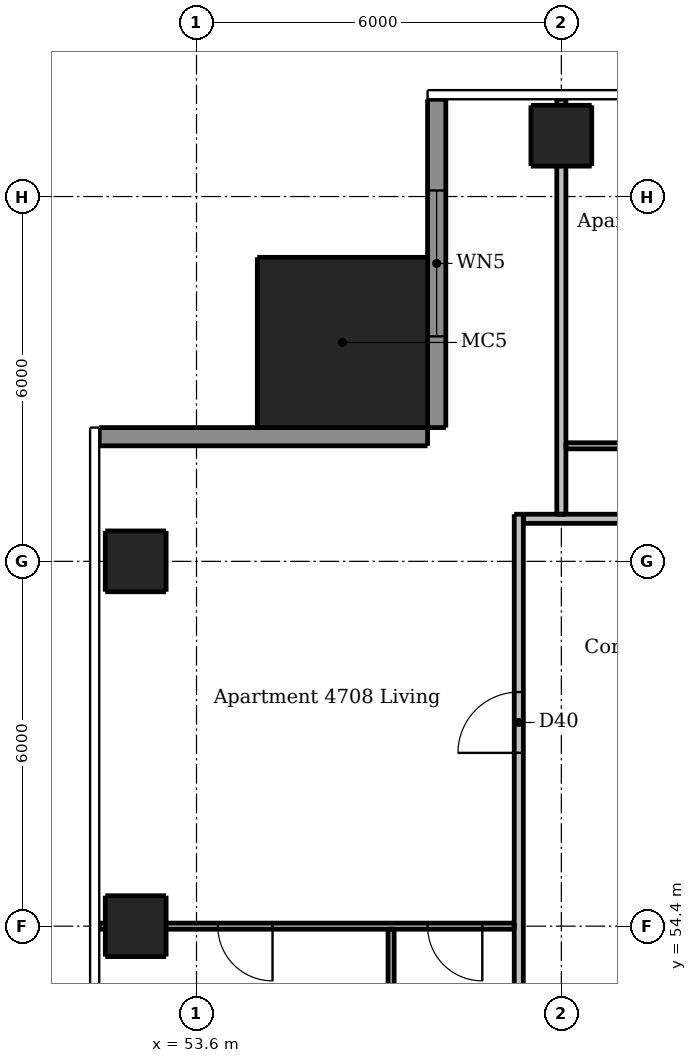
"""IFC4 building model, lengths in metres.
Left out: names, types, materials, properties, quantities, classifications, styles, units other than length and angle.
Written with IfcOpenShell. Run it as: python <this file> out.ifc"""

import sys

from ifc_helpers import new_model, si_unit, direction, frame, frame_2d, origin, origin_2d, place, context, subcontext, project, spatial, rectangle, extrude, element, fill, save


model = new_model("IFC4")
c1 = context("Model", 3, precision=1e-05, world=origin(), true_north=direction((0.0, 1.0)))
c2 = subcontext(c1, "Body", "Model", "MODEL_VIEW")
j1 = project(units=[si_unit("LENGTHUNIT", "METRE"), si_unit("PLANEANGLEUNIT", "RADIAN")], contexts=[c1])
p1 = place(None, origin())
s1 = spatial("IfcSite", under=j1, at=p1, CompositionType="ELEMENT")
p2 = place(p1, origin())
s2 = spatial("IfcBuilding", under=s1, at=p2, CompositionType="ELEMENT")
p3 = place(p2, frame((0.0, 0.0, 174.7)))
s3 = spatial("IfcBuildingStorey", under=s2, at=p3, CompositionType="ELEMENT", Elevation=174.7)
for number, where, z_axis, x_axis in (
    (1, (59.6, 67.4, 0.0), (0.0, 0.0, 1.0), (1.0, 0.0, 0.0)),
    (2, (52.6, 54.4, 0.0), (0.0, 0.0, 1.0), (1.0, 0.0, 0.0)),
    (3, (52.6, 60.4, 0.0), (0.0, 0.0, 1.0), (1.0, 0.0, 0.0)),
):
    element("IfcColumn", number, at=place(p3, frame(where, z_axis=z_axis, x_axis=x_axis)), inside=s3, PredefinedType="COLUMN", context=c2, shape_type="SweptSolid", body=[
        extrude(rectangle(XDim=1.0, YDim=1.0, at=origin_2d()), origin(), (0.0, 0.0, 1.0), 2.95),
    ])
p4 = place(p3, frame((56.0, 64.0, 0.0), z_axis=(0.0, 0.0, 1.0), x_axis=(1.0, 0.0, 0.0)))
e4 = element("IfcColumn", 4, at=p4, inside=s3, PredefinedType="COLUMN", context=c2, shape_type="SweptSolid", body=[
    extrude(rectangle(XDim=2.8, YDim=2.8, at=origin_2d()), origin(), (0.0, 0.0, 1.0), 3.3),
])
p5 = place(p3, frame((57.55, 68.0, 0.0), z_axis=(0.0, 0.0, 1.0), x_axis=(0.0, -1.0, 0.0)))
e5 = element("IfcWall", 5, at=p5, inside=s3, PredefinedType="SOLIDWALL", context=c2, shape_type="SweptSolid", body=[
    extrude(rectangle(XDim=5.4, YDim=0.3, at=frame_2d((2.7, 0.0))), origin(), (0.0, 0.0, 1.0), 2.95),
])
p6 = place(p5, frame((1.5, 0.0, 0.15)))
e6 = element("IfcOpeningElement", 6, at=p6, cuts=e5, PredefinedType="OPENING", context=c2, shape_type="SweptSolid", body=[
    extrude(rectangle(XDim=2.4, YDim=2.1, at=frame_2d((1.2, 1.05))), frame((0.0, 0.16, 0.0), z_axis=(0.0, -1.0, 0.0), x_axis=(1.0, 0.0, 0.0)), (0.0, 0.0, 1.0), 0.32),
])
p7 = place(p3, frame((57.4, 62.45, 0.0), z_axis=(0.0, 0.0, 1.0), x_axis=(-1.0, 0.0, 0.0)))
e7 = element("IfcWall", 7, at=p7, inside=s3, PredefinedType="SOLIDWALL", context=c2, shape_type="SweptSolid", body=[
    extrude(rectangle(XDim=5.4, YDim=0.3, at=frame_2d((2.7, 0.0))), origin(), (0.0, 0.0, 1.0), 2.95),
])
p8 = place(p3, frame((56.8, 54.35, 0.0), z_axis=(0.0, 0.0, 1.0), x_axis=(0.0, -1.0, 0.0)))
e8 = element("IfcWall", 8, at=p8, inside=s3, PredefinedType="PARTITIONING", context=c2, shape_type="SweptSolid", body=[
    extrude(rectangle(XDim=5.875, YDim=0.1, at=frame_2d((2.938, 0.0))), origin(), (0.0, 0.0, 1.0), 2.95),
])
p9 = place(p8, frame((3.75, 0.0, 0.0)))
e9 = element("IfcOpeningElement", 9, at=p9, cuts=e8, PredefinedType="OPENING", context=c2, shape_type="SweptSolid", body=[
    extrude(rectangle(XDim=0.8, YDim=2.1, at=frame_2d((0.4, 1.05))), frame((0.0, 0.06, 0.0), z_axis=(0.0, -1.0, 0.0), x_axis=(1.0, 0.0, 0.0)), (0.0, 0.0, 1.0), 0.12),
])
p10 = place(p3, frame((59.675, 62.3, 0.0), z_axis=(0.0, 0.0, 1.0), x_axis=(1.0, 0.0, 0.0)))
e10 = element("IfcWall", 10, at=p10, inside=s3, PredefinedType="PARTITIONING", context=c2, shape_type="SweptSolid", body=[
    extrude(rectangle(XDim=17.85, YDim=0.1, at=frame_2d((8.925, 0.0))), origin(), (0.0, 0.0, 1.0), 2.95),
])
p11 = place(p10, frame((13.275, 0.0, 0.0)))
e11 = element("IfcOpeningElement", 11, at=p11, cuts=e10, PredefinedType="OPENING", context=c2, shape_type="SweptSolid", body=[
    extrude(rectangle(XDim=0.9, YDim=2.1, at=frame_2d((0.45, 1.05))), frame((0.0, 0.06, 0.0), z_axis=(0.0, -1.0, 0.0), x_axis=(1.0, 0.0, 0.0)), (0.0, 0.0, 1.0), 0.12),
])
p12 = place(p10, frame((16.275, 0.0, 0.0)))
e12 = element("IfcOpeningElement", 12, at=p12, cuts=e10, PredefinedType="OPENING", context=c2, shape_type="SweptSolid", body=[
    extrude(rectangle(XDim=0.9, YDim=2.1, at=frame_2d((0.45, 1.05))), frame((0.0, 0.06, 0.0), z_axis=(0.0, -1.0, 0.0), x_axis=(1.0, 0.0, 0.0)), (0.0, 0.0, 1.0), 0.12),
])
p13 = place(p10, frame((1.275, 0.0, 0.0)))
e13 = element("IfcOpeningElement", 13, at=p13, cuts=e10, PredefinedType="OPENING", context=c2, shape_type="SweptSolid", body=[
    extrude(rectangle(XDim=0.9, YDim=2.1, at=frame_2d((0.45, 1.05))), frame((0.0, 0.06, 0.0), z_axis=(0.0, -1.0, 0.0), x_axis=(1.0, 0.0, 0.0)), (0.0, 0.0, 1.0), 0.12),
])
p14 = place(p10, frame((7.275, 0.0, 0.0)))
e14 = element("IfcOpeningElement", 14, at=p14, cuts=e10, PredefinedType="OPENING", context=c2, shape_type="SweptSolid", body=[
    extrude(rectangle(XDim=0.9, YDim=2.1, at=frame_2d((0.45, 1.05))), frame((0.0, 0.06, 0.0), z_axis=(0.0, -1.0, 0.0), x_axis=(1.0, 0.0, 0.0)), (0.0, 0.0, 1.0), 0.12),
])
p15 = place(p10, frame((4.325, 0.0, 0.0)))
e15 = element("IfcOpeningElement", 15, at=p15, cuts=e10, PredefinedType="OPENING", context=c2, shape_type="SweptSolid", body=[
    extrude(rectangle(XDim=0.8, YDim=2.1, at=frame_2d((0.4, 1.05))), frame((0.0, 0.06, 0.0), z_axis=(0.0, -1.0, 0.0), x_axis=(1.0, 0.0, 0.0)), (0.0, 0.0, 1.0), 0.12),
])
p16 = place(p10, frame((10.325, 0.0, 0.0)))
e16 = element("IfcOpeningElement", 16, at=p16, cuts=e10, PredefinedType="OPENING", context=c2, shape_type="SweptSolid", body=[
    extrude(rectangle(XDim=0.8, YDim=2.1, at=frame_2d((0.4, 1.05))), frame((0.0, 0.06, 0.0), z_axis=(0.0, -1.0, 0.0), x_axis=(1.0, 0.0, 0.0)), (0.0, 0.0, 1.0), 0.12),
])
p17 = place(p3, frame((58.825, 54.4, 0.0), z_axis=(0.0, 0.0, 1.0), x_axis=(-1.0, 0.0, 0.0)))
e17 = element("IfcWall", 17, at=p17, inside=s3, PredefinedType="PARTITIONING", context=c2, shape_type="SweptSolid", body=[
    extrude(rectangle(XDim=6.825, YDim=0.1, at=frame_2d((3.413, 0.0))), origin(), (0.0, 0.0, 1.0), 2.332),
])
p18 = place(p17, frame((0.525, 0.0, 0.0)))
e18 = element("IfcOpeningElement", 18, at=p18, cuts=e17, PredefinedType="OPENING", context=c2, shape_type="SweptSolid", body=[
    extrude(rectangle(XDim=0.9, YDim=2.1, at=frame_2d((0.45, 1.05))), frame((0.0, 0.06, 0.0), z_axis=(0.0, -1.0, 0.0), x_axis=(1.0, 0.0, 0.0)), (0.0, 0.0, 1.0), 0.12),
])
p19 = place(p17, frame((3.975, 0.0, 0.0)))
e19 = element("IfcOpeningElement", 19, at=p19, cuts=e17, PredefinedType="OPENING", context=c2, shape_type="SweptSolid", body=[
    extrude(rectangle(XDim=0.9, YDim=2.1, at=frame_2d((0.45, 1.05))), frame((0.0, 0.06, 0.0), z_axis=(0.0, -1.0, 0.0), x_axis=(1.0, 0.0, 0.0)), (0.0, 0.0, 1.0), 0.12),
])
p20 = place(p3, frame((58.9, 30.325, 0.0), z_axis=(0.0, 0.0, 1.0), x_axis=(0.0, 1.0, 0.0)))
e20 = element("IfcWall", 20, at=p20, inside=s3, PredefinedType="PARTITIONING", context=c2, shape_type="SweptSolid", body=[
    extrude(rectangle(XDim=30.85, YDim=0.15, at=frame_2d((15.425, 0.0))), origin(), (0.0, 0.0, 1.0), 2.95),
])
p21 = place(p20, frame((9.225, 0.0, 0.0)))
e21 = element("IfcOpeningElement", 21, at=p21, cuts=e20, PredefinedType="OPENING", context=c2, shape_type="SweptSolid", body=[
    extrude(rectangle(XDim=1.0, YDim=2.1, at=frame_2d((0.5, 1.05))), frame((0.0, 0.085, 0.0), z_axis=(0.0, -1.0, 0.0), x_axis=(1.0, 0.0, 0.0)), (0.0, 0.0, 1.0), 0.17),
])
p22 = place(p20, frame((26.925, 0.0, 0.0)))
e22 = element("IfcOpeningElement", 22, at=p22, cuts=e20, PredefinedType="OPENING", context=c2, shape_type="SweptSolid", body=[
    extrude(rectangle(XDim=1.0, YDim=2.1, at=frame_2d((0.5, 1.05))), frame((0.0, 0.085, 0.0), z_axis=(0.0, -1.0, 0.0), x_axis=(1.0, 0.0, 0.0)), (0.0, 0.0, 1.0), 0.17),
])
p23 = place(p3, frame((59.6, 61.175, 0.0), z_axis=(0.0, 0.0, 1.0), x_axis=(0.0, 1.0, 0.0)))
e23 = element("IfcWall", 23, at=p23, inside=s3, PredefinedType="PARTITIONING", context=c2, shape_type="SweptSolid", body=[
    extrude(rectangle(XDim=6.825, YDim=0.15, at=frame_2d((3.413, 0.0))), origin(), (0.0, 0.0, 1.0), 2.332),
])
p24 = place(p3, frame((58.975, 61.1, 0.0), z_axis=(0.0, 0.0, 1.0), x_axis=(1.0, 0.0, 0.0)))
e24 = element("IfcWall", 24, at=p24, inside=s3, PredefinedType="PARTITIONING", context=c2, shape_type="SweptSolid", body=[
    extrude(rectangle(XDim=29.25, YDim=0.15, at=frame_2d((14.625, 0.0))), origin(), (0.0, 0.0, 1.0), 2.95),
])
p25 = place(p24, frame((9.125, 0.0, 0.0)))
e25 = element("IfcOpeningElement", 25, at=p25, cuts=e24, PredefinedType="OPENING", context=c2, shape_type="SweptSolid", body=[
    extrude(rectangle(XDim=1.0, YDim=2.1, at=frame_2d((0.5, 1.05))), frame((0.0, 0.085, 0.0), z_axis=(0.0, -1.0, 0.0), x_axis=(1.0, 0.0, 0.0)), (0.0, 0.0, 1.0), 0.17),
])
p26 = place(p24, frame((26.475, 0.0, 0.0)))
e26 = element("IfcOpeningElement", 26, at=p26, cuts=e24, PredefinedType="OPENING", context=c2, shape_type="SweptSolid", body=[
    extrude(rectangle(XDim=1.0, YDim=2.1, at=frame_2d((0.5, 1.05))), frame((0.0, 0.085, 0.0), z_axis=(0.0, -1.0, 0.0), x_axis=(1.0, 0.0, 0.0)), (0.0, 0.0, 1.0), 0.17),
])
p27 = place(p6, origin())
e27 = element("IfcWindow", 27, at=p27, inside=s3, PartitioningType="DOUBLE_PANEL_VERTICAL", PredefinedType="WINDOW", context=c2, shape_type="SweptSolid", body=[
    extrude(rectangle(XDim=2.4, YDim=2.1, at=frame_2d((1.2, 1.05))), frame((0.0, 0.03, 0.0), z_axis=(0.0, -1.0, 0.0), x_axis=(1.0, 0.0, 0.0)), (0.0, 0.0, 1.0), 0.06),
])
fill(e6, e27)
p28 = place(p22, origin())
e28 = element("IfcDoor", 28, at=p28, inside=s3, OperationType="SINGLE_SWING_LEFT", PredefinedType="DOOR", context=c2, shape_type="SweptSolid", body=[
    extrude(rectangle(XDim=1.0, YDim=2.1, at=frame_2d((0.5, 1.05))), frame((0.0, 0.025, 0.0), z_axis=(0.0, -1.0, 0.0), x_axis=(1.0, 0.0, 0.0)), (0.0, 0.0, 1.0), 0.05),
])
fill(e22, e28)
p29 = place(p18, origin())
e29 = element("IfcDoor", 29, at=p29, inside=s3, OperationType="SINGLE_SWING_LEFT", PredefinedType="DOOR", context=c2, shape_type="SweptSolid", body=[
    extrude(rectangle(XDim=0.9, YDim=2.1, at=frame_2d((0.45, 1.05))), frame((0.0, 0.025, 0.0), z_axis=(0.0, -1.0, 0.0), x_axis=(1.0, 0.0, 0.0)), (0.0, 0.0, 1.0), 0.05),
])
fill(e18, e29)
p30 = place(p19, origin())
e30 = element("IfcDoor", 30, at=p30, inside=s3, OperationType="SINGLE_SWING_LEFT", PredefinedType="DOOR", context=c2, shape_type="SweptSolid", body=[
    extrude(rectangle(XDim=0.9, YDim=2.1, at=frame_2d((0.45, 1.05))), frame((0.0, 0.025, 0.0), z_axis=(0.0, -1.0, 0.0), x_axis=(1.0, 0.0, 0.0)), (0.0, 0.0, 1.0), 0.05),
])
fill(e19, e30)
save(model, sys.argv[1])
